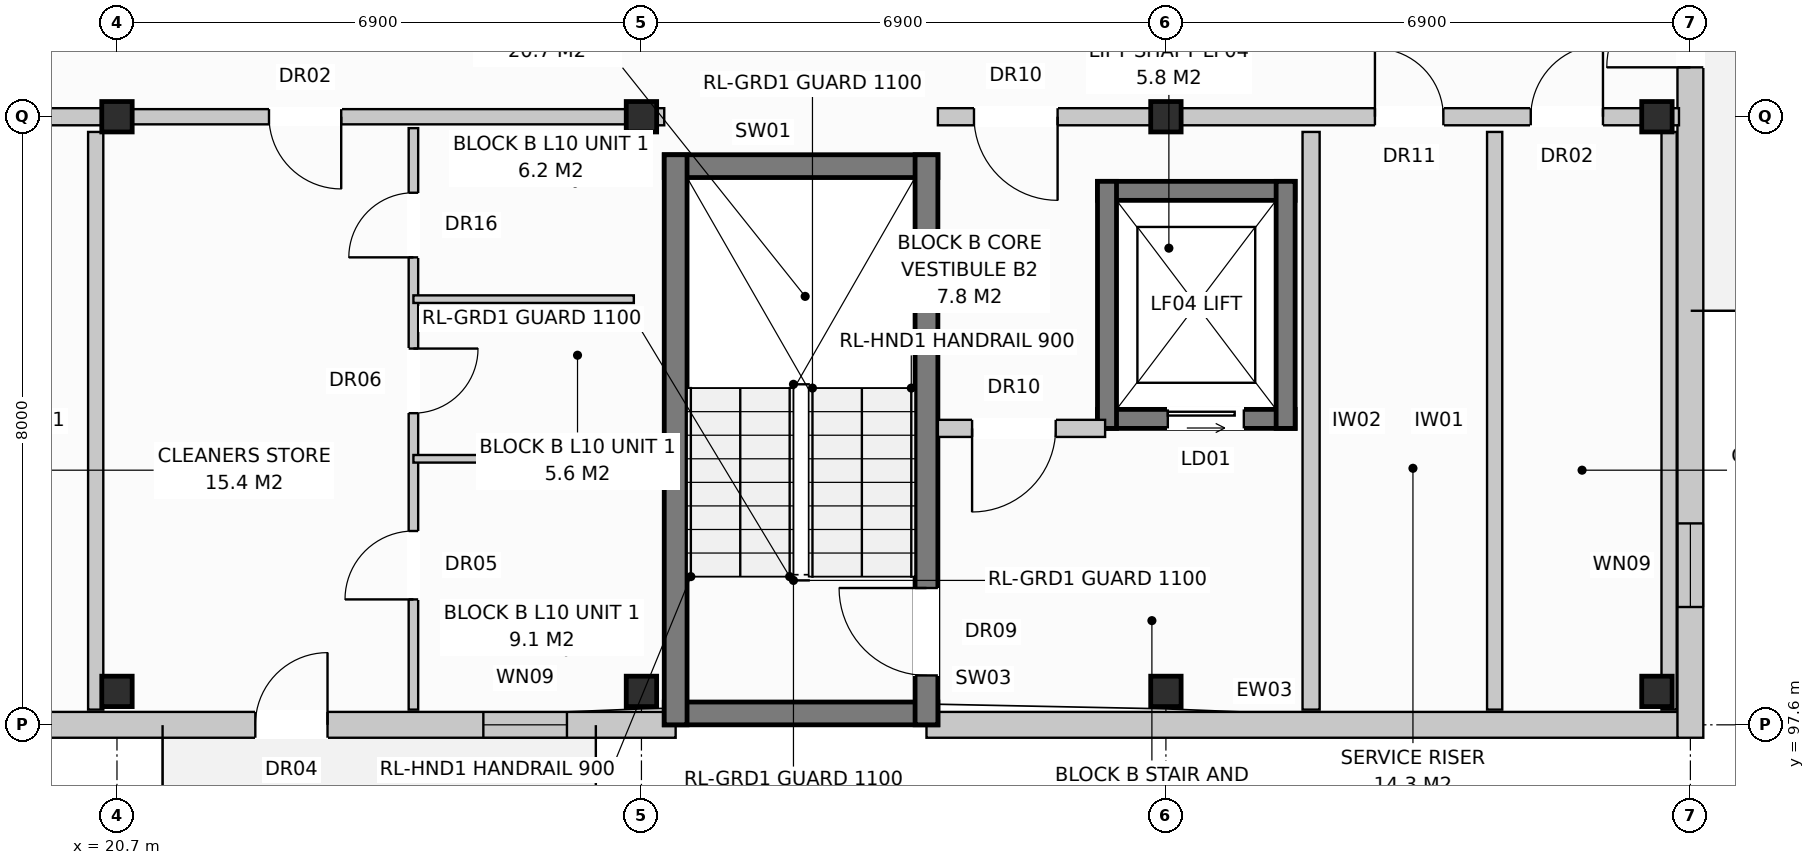
"""IFC4 building model, lengths in metres.
Left out: names, types, materials, properties, quantities, classifications, styles, units other than length and angle.
Written with IfcOpenShell. Run it as: python <this file> out.ifc"""

import sys

from ifc_helpers import new_model, si_unit, direction, frame, frame_2d, origin, origin_with_axes, origin_2d, place, context, subcontext, project, spatial, rectangle, extrude, element, fill, save


model = new_model("IFC4")
c1 = context("Model", 3, precision=1e-05, world=origin(), true_north=direction((0.0, 1.0)))
c2 = subcontext(c1, "Body", "Model", "MODEL_VIEW")
j1 = project(units=[si_unit("LENGTHUNIT", "METRE"), si_unit("PLANEANGLEUNIT", "RADIAN")], contexts=[c1])
p1 = place(None, origin())
s1 = spatial("IfcSite", under=j1, at=p1, CompositionType="ELEMENT")
p2 = place(p1, origin())
s2 = spatial("IfcBuilding", under=s1, at=p2, CompositionType="ELEMENT")
p3 = place(p2, frame((0.0, 0.0, 33.6)))
s3 = spatial("IfcBuildingStorey", under=s2, at=p3, CompositionType="ELEMENT", Elevation=33.6)
for number, where, z_axis, x_axis in (
    (1, (20.7, 98.04, 0.0), (0.0, 0.0, 1.0), (1.0, 0.0, 0.0)),
    (2, (20.7, 105.6, 0.0), (0.0, 0.0, 1.0), (1.0, 0.0, 0.0)),
    (3, (27.6, 98.04, 0.0), (0.0, 0.0, 1.0), (1.0, 0.0, 0.0)),
    (4, (27.6, 105.6, 0.0), (0.0, 0.0, 1.0), (1.0, 0.0, 0.0)),
    (5, (34.5, 98.04, 0.0), (0.0, 0.0, 1.0), (1.0, 0.0, 0.0)),
    (6, (34.5, 105.6, 0.0), (0.0, 0.0, 1.0), (1.0, 0.0, 0.0)),
    (7, (40.96, 98.04, 0.0), (0.0, 0.0, 1.0), (1.0, 0.0, 0.0)),
    (8, (40.96, 105.6, 0.0), (0.0, 0.0, 1.0), (1.0, 0.0, 0.0)),
):
    element("IfcColumn", number, at=place(p3, frame(where, z_axis=z_axis, x_axis=x_axis)), inside=s3, PredefinedType="COLUMN", context=c2, shape_type="SweptSolid", body=[
        extrude(rectangle(XDim=0.4, YDim=0.4, at=origin_2d()), origin(), (0.0, 0.0, 1.0), 3.2),
    ])
p4 = place(p3, frame((10.65, 97.6, 0.0), z_axis=(0.0, 0.0, 1.0), x_axis=(1.0, 0.0, 0.0)))
e9 = element("IfcWall", 9, at=p4, inside=s3, PredefinedType="STANDARD", context=c2, shape_type="SweptSolid", body=[
    extrude(rectangle(XDim=17.4, YDim=0.34, at=frame_2d((8.7, 0.0))), origin(), (0.0, 0.0, 1.0), 2.96),
])
p5 = place(p4, frame((11.87, 0.0, 0.0)))
e10 = element("IfcOpeningElement", 10, at=p5, cuts=e9, PredefinedType="OPENING", context=c2, shape_type="SweptSolid", body=[
    extrude(rectangle(XDim=0.95, YDim=2.1, at=frame_2d((0.475, 1.05))), frame((0.0, 0.182, 0.0), z_axis=(0.0, -1.0, 0.0), x_axis=(1.0, 0.0, 0.0)), (0.0, 0.0, 1.0), 0.364),
])
p6 = place(p4, frame((14.87, 0.0, 0.72)))
e11 = element("IfcOpeningElement", 11, at=p6, cuts=e9, PredefinedType="OPENING", context=c2, shape_type="SweptSolid", body=[
    extrude(rectangle(XDim=1.1, YDim=1.5, at=frame_2d((0.55, 0.75))), frame((0.0, 0.182, 0.0), z_axis=(0.0, -1.0, 0.0), x_axis=(1.0, 0.0, 0.0)), (0.0, 0.0, 1.0), 0.364),
])
p7 = place(p3, frame((31.35, 97.6, 0.0), z_axis=(0.0, 0.0, 1.0), x_axis=(1.0, 0.0, 0.0)))
e12 = element("IfcWall", 12, at=p7, inside=s3, PredefinedType="STANDARD", context=c2, shape_type="SweptSolid", body=[
    extrude(rectangle(XDim=9.89, YDim=0.34, at=frame_2d((4.945, 0.0))), origin(), (0.0, 0.0, 1.0), 2.96),
])
p8 = place(p3, frame((41.4, 97.43, 0.0), z_axis=(0.0, 0.0, 1.0), x_axis=(0.0, 1.0, 0.0)))
e13 = element("IfcWall", 13, at=p8, inside=s3, PredefinedType="STANDARD", context=c2, shape_type="SweptSolid", body=[
    extrude(rectangle(XDim=18.74, YDim=0.34, at=frame_2d((9.37, 0.0))), origin(), (0.0, 0.0, 1.0), 2.96),
])
p9 = place(p8, frame((8.82, 0.0, 0.0)))
e14 = element("IfcOpeningElement", 14, at=p9, cuts=e13, PredefinedType="OPENING", context=c2, shape_type="SweptSolid", body=[
    extrude(rectangle(XDim=1.1, YDim=2.1, at=frame_2d((0.55, 1.05))), frame((0.0, 0.182, 0.0), z_axis=(0.0, -1.0, 0.0), x_axis=(1.0, 0.0, 0.0)), (0.0, 0.0, 1.0), 0.364),
])
p10 = place(p8, frame((1.72, 0.0, 0.72)))
e15 = element("IfcOpeningElement", 15, at=p10, cuts=e13, PredefinedType="OPENING", context=c2, shape_type="SweptSolid", body=[
    extrude(rectangle(XDim=1.1, YDim=1.5, at=frame_2d((0.55, 0.75))), frame((0.0, 0.182, 0.0), z_axis=(0.0, -1.0, 0.0), x_axis=(1.0, 0.0, 0.0)), (0.0, 0.0, 1.0), 0.364),
])
p11 = place(p8, frame((15.92, 0.0, 0.72)))
e16 = element("IfcOpeningElement", 16, at=p11, cuts=e13, PredefinedType="OPENING", context=c2, shape_type="SweptSolid", body=[
    extrude(rectangle(XDim=1.1, YDim=1.5, at=frame_2d((0.55, 0.75))), frame((0.0, 0.182, 0.0), z_axis=(0.0, -1.0, 0.0), x_axis=(1.0, 0.0, 0.0)), (0.0, 0.0, 1.0), 0.364),
])
p12 = place(p3, frame((20.42, 97.8, 0.0), z_axis=(0.0, 0.0, 1.0), x_axis=(0.0, 1.0, 0.0)))
e17 = element("IfcWall", 17, at=p12, inside=s3, PredefinedType="PARTITIONING", context=c2, shape_type="SweptSolid", body=[
    extrude(rectangle(XDim=7.6, YDim=0.2, at=frame_2d((3.8, 0.0))), origin(), (0.0, 0.0, 1.0), 2.96),
])
p13 = place(p3, frame((10.8, 105.6, 0.0), z_axis=(0.0, 0.0, 1.0), x_axis=(1.0, 0.0, 0.0)))
e18 = element("IfcWall", 18, at=p13, inside=s3, PredefinedType="PARTITIONING", context=c2, shape_type="SweptSolid", body=[
    extrude(rectangle(XDim=9.9, YDim=0.225, at=frame_2d((4.95, 0.0))), origin(), (0.0, 0.0, 1.0), 2.4),
])
p14 = place(p13, frame((0.475, 0.0, 0.0)))
e19 = element("IfcOpeningElement", 19, at=p14, cuts=e18, PredefinedType="OPENING", context=c2, shape_type="SweptSolid", body=[
    extrude(rectangle(XDim=1.1, YDim=2.15, at=frame_2d((0.55, 1.075))), frame((0.0, 0.125, 0.0), z_axis=(0.0, -1.0, 0.0), x_axis=(1.0, 0.0, 0.0)), (0.0, 0.0, 1.0), 0.249),
])
p15 = place(p13, frame((5.75, 0.0, 0.0)))
e20 = element("IfcOpeningElement", 20, at=p15, cuts=e18, PredefinedType="OPENING", context=c2, shape_type="SweptSolid", body=[
    extrude(rectangle(XDim=0.9, YDim=2.1, at=frame_2d((0.45, 1.05))), frame((0.0, 0.125, 0.0), z_axis=(0.0, -1.0, 0.0), x_axis=(1.0, 0.0, 0.0)), (0.0, 0.0, 1.0), 0.249),
])
p16 = place(p13, frame((7.8, 0.0, 0.0)))
e21 = element("IfcOpeningElement", 21, at=p16, cuts=e18, PredefinedType="OPENING", context=c2, shape_type="SweptSolid", body=[
    extrude(rectangle(XDim=0.95, YDim=2.15, at=frame_2d((0.475, 1.075))), frame((0.0, 0.125, 0.0), z_axis=(0.0, -1.0, 0.0), x_axis=(1.0, 0.0, 0.0)), (0.0, 0.0, 1.0), 0.249),
])
for number, where, z_axis, x_axis in (
    (22, (27.9, 97.75, 0.0), (0.0, 0.0, 1.0), (1.0, 0.0, 0.0)),
    (23, (27.9, 104.95, 0.0), (0.0, 0.0, 1.0), (1.0, 0.0, 0.0)),
):
    element("IfcWall", number, at=place(p3, frame(where, z_axis=z_axis, x_axis=x_axis)), inside=s3, PredefinedType="SHEAR", context=c2, shape_type="SweptSolid", body=[
        extrude(rectangle(XDim=3.6, YDim=0.3, at=frame_2d((1.8, 0.0))), origin(), (0.0, 0.0, 1.0), 2.96),
    ])
p17 = place(p3, frame((28.05, 97.6, 0.0), z_axis=(0.0, 0.0, 1.0), x_axis=(0.0, 1.0, 0.0)))
e24 = element("IfcWall", 24, at=p17, inside=s3, PredefinedType="SHEAR", context=c2, shape_type="SweptSolid", body=[
    extrude(rectangle(XDim=7.5, YDim=0.3, at=frame_2d((3.75, 0.0))), origin(), (0.0, 0.0, 1.0), 2.96),
])
p18 = place(p3, frame((31.35, 97.6, 0.0), z_axis=(0.0, 0.0, 1.0), x_axis=(0.0, 1.0, 0.0)))
e25 = element("IfcWall", 25, at=p18, inside=s3, PredefinedType="SHEAR", context=c2, shape_type="SweptSolid", body=[
    extrude(rectangle(XDim=7.5, YDim=0.3, at=frame_2d((3.75, 0.0))), origin(), (0.0, 0.0, 1.0), 2.96),
])
p19 = place(p18, frame((0.65, 0.0, 0.0)))
e26 = element("IfcOpeningElement", 26, at=p19, cuts=e25, PredefinedType="OPENING", context=c2, shape_type="SweptSolid", body=[
    extrude(rectangle(XDim=1.15, YDim=2.15, at=frame_2d((0.575, 1.075))), frame((0.0, 0.162, 0.0), z_axis=(0.0, -1.0, 0.0), x_axis=(1.0, 0.0, 0.0)), (0.0, 0.0, 1.0), 0.324),
])
p20 = place(p3, frame((33.6, 101.625, 0.0), z_axis=(0.0, 0.0, 1.0), x_axis=(1.0, 0.0, 0.0)))
e27 = element("IfcWall", 27, at=p20, inside=s3, PredefinedType="SHEAR", context=c2, shape_type="SweptSolid", body=[
    extrude(rectangle(XDim=2.6, YDim=0.25, at=frame_2d((1.3, 0.0))), origin(), (0.0, 0.0, 1.0), 2.96),
])
p21 = place(p20, frame((0.925, 0.0, 0.0)))
e28 = element("IfcOpeningElement", 28, at=p21, cuts=e27, PredefinedType="OPENING", context=c2, shape_type="SweptSolid", body=[
    extrude(rectangle(XDim=1.0, YDim=2.1, at=frame_2d((0.5, 1.05))), frame((0.0, 0.137, 0.0), z_axis=(0.0, -1.0, 0.0), x_axis=(1.0, 0.0, 0.0)), (0.0, 0.0, 1.0), 0.274),
])
p22 = place(p3, frame((33.6, 104.625, 0.0), z_axis=(0.0, 0.0, 1.0), x_axis=(1.0, 0.0, 0.0)))
e29 = element("IfcWall", 29, at=p22, inside=s3, PredefinedType="SHEAR", context=c2, shape_type="SweptSolid", body=[
    extrude(rectangle(XDim=2.6, YDim=0.25, at=frame_2d((1.3, 0.0))), origin(), (0.0, 0.0, 1.0), 2.96),
])
for number, where, z_axis, x_axis in (
    (30, (33.725, 101.5, 0.0), (0.0, 0.0, 1.0), (0.0, 1.0, 0.0)),
    (31, (36.075, 101.5, 0.0), (0.0, 0.0, 1.0), (0.0, 1.0, 0.0)),
):
    element("IfcWall", number, at=place(p3, frame(where, z_axis=z_axis, x_axis=x_axis)), inside=s3, PredefinedType="SHEAR", context=c2, shape_type="SweptSolid", body=[
        extrude(rectangle(XDim=3.25, YDim=0.25, at=frame_2d((1.625, 0.0))), origin(), (0.0, 0.0, 1.0), 2.96),
    ])
p23 = place(p3, frame((36.41, 97.8, 0.0), z_axis=(0.0, 0.0, 1.0), x_axis=(0.0, 1.0, 0.0)))
e32 = element("IfcWall", 32, at=p23, inside=s3, PredefinedType="PARTITIONING", context=c2, shape_type="SweptSolid", body=[
    extrude(rectangle(XDim=7.6, YDim=0.225, at=frame_2d((3.8, 0.0))), origin(), (0.0, 0.0, 1.0), 2.59),
])
p24 = place(p3, frame((31.5, 101.5, 0.0), z_axis=(0.0, 0.0, 1.0), x_axis=(1.0, 0.0, 0.0)))
e33 = element("IfcWall", 33, at=p24, inside=s3, PredefinedType="PARTITIONING", context=c2, shape_type="SweptSolid", body=[
    extrude(rectangle(XDim=2.2, YDim=0.225, at=frame_2d((1.1, 0.0))), origin(), (0.0, 0.0, 1.0), 2.96),
])
p25 = place(p24, frame((0.45, 0.0, 0.0)))
e34 = element("IfcOpeningElement", 34, at=p25, cuts=e33, PredefinedType="OPENING", context=c2, shape_type="SweptSolid", body=[
    extrude(rectangle(XDim=1.1, YDim=2.15, at=frame_2d((0.55, 1.075))), frame((0.0, 0.125, 0.0), z_axis=(0.0, -1.0, 0.0), x_axis=(1.0, 0.0, 0.0)), (0.0, 0.0, 1.0), 0.249),
])
p26 = place(p3, frame((27.6, 105.6, 0.0), z_axis=(0.0, 0.0, 1.0), x_axis=(1.0, 0.0, 0.0)))
e35 = element("IfcWall", 35, at=p26, inside=s3, PredefinedType="PARTITIONING", context=c2, shape_type="SweptSolid", body=[
    extrude(rectangle(XDim=0.3, YDim=0.225, at=frame_2d((0.15, 0.0))), origin(), (0.0, 0.0, 1.0), 2.96),
])
p27 = place(p3, frame((38.825, 97.8, 0.0), z_axis=(0.0, 0.0, 1.0), x_axis=(0.0, 1.0, 0.0)))
e36 = element("IfcWall", 36, at=p27, inside=s3, PredefinedType="PARTITIONING", context=c2, shape_type="SweptSolid", body=[
    extrude(rectangle(XDim=7.6, YDim=0.2, at=frame_2d((3.8, 0.0))), origin(), (0.0, 0.0, 1.0), 2.96),
])
p28 = place(p3, frame((41.12, 97.8, 0.0), z_axis=(0.0, 0.0, 1.0), x_axis=(0.0, 1.0, 0.0)))
e37 = element("IfcWall", 37, at=p28, inside=s3, PredefinedType="PARTITIONING", context=c2, shape_type="SweptSolid", body=[
    extrude(rectangle(XDim=7.6, YDim=0.2, at=frame_2d((3.8, 0.0))), origin(), (0.0, 0.0, 1.0), 2.4),
])
p29 = place(p3, frame((31.5, 105.6, 0.0), z_axis=(0.0, 0.0, 1.0), x_axis=(1.0, 0.0, 0.0)))
e38 = element("IfcWall", 38, at=p29, inside=s3, PredefinedType="PARTITIONING", context=c2, shape_type="SweptSolid", body=[
    extrude(rectangle(XDim=9.75, YDim=0.225, at=frame_2d((4.875, 0.0))), origin(), (0.0, 0.0, 1.0), 2.4),
])
p30 = place(p29, frame((0.475, 0.0, 0.0)))
e39 = element("IfcOpeningElement", 39, at=p30, cuts=e38, PredefinedType="OPENING", context=c2, shape_type="SweptSolid", body=[
    extrude(rectangle(XDim=1.1, YDim=2.15, at=frame_2d((0.55, 1.075))), frame((0.0, 0.125, 0.0), z_axis=(0.0, -1.0, 0.0), x_axis=(1.0, 0.0, 0.0)), (0.0, 0.0, 1.0), 0.249),
])
p31 = place(p29, frame((5.75, 0.0, 0.0)))
e40 = element("IfcOpeningElement", 40, at=p31, cuts=e38, PredefinedType="OPENING", context=c2, shape_type="SweptSolid", body=[
    extrude(rectangle(XDim=0.9, YDim=2.1, at=frame_2d((0.45, 1.05))), frame((0.0, 0.125, 0.0), z_axis=(0.0, -1.0, 0.0), x_axis=(1.0, 0.0, 0.0)), (0.0, 0.0, 1.0), 0.249),
])
p32 = place(p29, frame((7.8, 0.0, 0.0)))
e41 = element("IfcOpeningElement", 41, at=p32, cuts=e38, PredefinedType="OPENING", context=c2, shape_type="SweptSolid", body=[
    extrude(rectangle(XDim=0.95, YDim=2.15, at=frame_2d((0.475, 1.075))), frame((0.0, 0.125, 0.0), z_axis=(0.0, -1.0, 0.0), x_axis=(1.0, 0.0, 0.0)), (0.0, 0.0, 1.0), 0.249),
])
p33 = place(p3, frame((20.7, 105.6, 0.0), z_axis=(0.0, 0.0, 1.0), x_axis=(1.0, 0.0, 0.0)))
e42 = element("IfcWall", 42, at=p33, inside=s3, PredefinedType="PARTITIONING", context=c2, shape_type="SweptSolid", body=[
    extrude(rectangle(XDim=6.9, YDim=0.2, at=frame_2d((3.45, 0.0))), origin(), (0.0, 0.0, 1.0), 2.4),
])
p34 = place(p33, frame((2.0, 0.0, 0.0)))
e43 = element("IfcOpeningElement", 43, at=p34, cuts=e42, PredefinedType="OPENING", context=c2, shape_type="SweptSolid", body=[
    extrude(rectangle(XDim=0.95, YDim=2.15, at=frame_2d((0.475, 1.075))), frame((0.0, 0.112, 0.0), z_axis=(0.0, -1.0, 0.0), x_axis=(1.0, 0.0, 0.0)), (0.0, 0.0, 1.0), 0.224),
])
p35 = place(p3, frame((24.6, 105.45, 0.0), z_axis=(0.0, 0.0, 1.0), x_axis=(0.0, -1.0, 0.0)))
e44 = element("IfcWall", 44, at=p35, inside=s3, PredefinedType="PARTITIONING", context=c2, shape_type="SweptSolid", body=[
    extrude(rectangle(XDim=7.65, YDim=0.125, at=frame_2d((3.825, 0.0))), origin(), (0.0, 0.0, 1.0), 2.96),
])
p36 = place(p35, frame((0.85, 0.0, 0.0)))
e45 = element("IfcOpeningElement", 45, at=p36, cuts=e44, PredefinedType="OPENING", context=c2, shape_type="SweptSolid", body=[
    extrude(rectangle(XDim=0.85, YDim=2.1, at=frame_2d((0.425, 1.05))), frame((0.0, 0.074, 0.0), z_axis=(0.0, -1.0, 0.0), x_axis=(1.0, 0.0, 0.0)), (0.0, 0.0, 1.0), 0.149),
])
p37 = place(p35, frame((2.9, 0.0, 0.0)))
e46 = element("IfcOpeningElement", 46, at=p37, cuts=e44, PredefinedType="OPENING", context=c2, shape_type="SweptSolid", body=[
    extrude(rectangle(XDim=0.85, YDim=2.05, at=frame_2d((0.425, 1.025))), frame((0.0, 0.074, 0.0), z_axis=(0.0, -1.0, 0.0), x_axis=(1.0, 0.0, 0.0)), (0.0, 0.0, 1.0), 0.149),
])
p38 = place(p35, frame((5.3, 0.0, 0.0)))
e47 = element("IfcOpeningElement", 47, at=p38, cuts=e44, PredefinedType="OPENING", context=c2, shape_type="SweptSolid", body=[
    extrude(rectangle(XDim=0.9, YDim=2.1, at=frame_2d((0.45, 1.05))), frame((0.0, 0.074, 0.0), z_axis=(0.0, -1.0, 0.0), x_axis=(1.0, 0.0, 0.0)), (0.0, 0.0, 1.0), 0.149),
])
for number, where, z_axis, x_axis in (
    (48, (24.6, 103.2, 0.0), (0.0, 0.0, 1.0), (1.0, 0.0, 0.0)),
    (49, (24.6, 101.1, 0.0), (0.0, 0.0, 1.0), (1.0, 0.0, 0.0)),
):
    element("IfcWall", number, at=place(p3, frame(where, z_axis=z_axis, x_axis=x_axis)), inside=s3, PredefinedType="PARTITIONING", context=c2, shape_type="SweptSolid", body=[
        extrude(rectangle(XDim=2.9, YDim=0.1, at=frame_2d((1.45, 0.0))), origin(), (0.0, 0.0, 1.0), 2.96),
    ])
p39 = place(p5, origin_with_axes())
e50 = element("IfcDoor", 50, at=p39, inside=s3, OperationType="SINGLE_SWING_RIGHT", PredefinedType="DOOR", context=c2, shape_type="SweptSolid", body=[
    extrude(rectangle(XDim=0.95, YDim=2.1, at=frame_2d((0.475, 1.05))), frame((0.0, 0.025, 0.0), z_axis=(0.0, -1.0, 0.0), x_axis=(1.0, 0.0, 0.0)), (0.0, 0.0, 1.0), 0.05),
])
fill(e10, e50)
p40 = place(p6, origin_with_axes())
e51 = element("IfcWindow", 51, at=p40, inside=s3, PartitioningType="SINGLE_PANEL", PredefinedType="WINDOW", context=c2, shape_type="SweptSolid", body=[
    extrude(rectangle(XDim=1.1, YDim=1.5, at=frame_2d((0.55, 0.75))), frame((0.0, 0.03, 0.0), z_axis=(0.0, -1.0, 0.0), x_axis=(1.0, 0.0, 0.0)), (0.0, 0.0, 1.0), 0.06),
])
fill(e11, e51)
p41 = place(p9, origin_with_axes())
e52 = element("IfcDoor", 52, at=p41, inside=s3, OperationType="SINGLE_SWING_LEFT", PredefinedType="DOOR", context=c2, shape_type="SweptSolid", body=[
    extrude(rectangle(XDim=1.1, YDim=2.1, at=frame_2d((0.55, 1.05))), frame((0.0, 0.025, 0.0), z_axis=(0.0, -1.0, 0.0), x_axis=(1.0, 0.0, 0.0)), (0.0, 0.0, 1.0), 0.05),
])
fill(e14, e52)
p42 = place(p10, origin_with_axes())
e53 = element("IfcWindow", 53, at=p42, inside=s3, PartitioningType="SINGLE_PANEL", PredefinedType="WINDOW", context=c2, shape_type="SweptSolid", body=[
    extrude(rectangle(XDim=1.1, YDim=1.5, at=frame_2d((0.55, 0.75))), frame((0.0, 0.03, 0.0), z_axis=(0.0, -1.0, 0.0), x_axis=(1.0, 0.0, 0.0)), (0.0, 0.0, 1.0), 0.06),
])
fill(e15, e53)
p43 = place(p19, origin_with_axes())
e54 = element("IfcDoor", 54, at=p43, inside=s3, OperationType="SINGLE_SWING_RIGHT", PredefinedType="DOOR", context=c2, shape_type="SweptSolid", body=[
    extrude(rectangle(XDim=1.15, YDim=2.15, at=frame_2d((0.575, 1.075))), frame((0.0, 0.025, 0.0), z_axis=(0.0, -1.0, 0.0), x_axis=(1.0, 0.0, 0.0)), (0.0, 0.0, 1.0), 0.05),
])
fill(e26, e54)
p44 = place(p21, origin_with_axes())
e55 = element("IfcDoor", 55, at=p44, inside=s3, OperationType="SLIDING_TO_LEFT", PredefinedType="DOOR", context=c2, shape_type="SweptSolid", body=[
    extrude(rectangle(XDim=1.0, YDim=2.1, at=frame_2d((0.5, 1.05))), frame((0.0, 0.025, 0.0), z_axis=(0.0, -1.0, 0.0), x_axis=(1.0, 0.0, 0.0)), (0.0, 0.0, 1.0), 0.05),
])
fill(e28, e55)
p45 = place(p25, frame((1.1, 0.0, 0.0), z_axis=(0.0, 0.0, 1.0), x_axis=(-1.0, 0.0, 0.0)))
e56 = element("IfcDoor", 56, at=p45, inside=s3, OperationType="SINGLE_SWING_LEFT", PredefinedType="DOOR", context=c2, shape_type="SweptSolid", body=[
    extrude(rectangle(XDim=1.1, YDim=2.15, at=frame_2d((0.55, 1.075))), frame((0.0, 0.025, 0.0), z_axis=(0.0, -1.0, 0.0), x_axis=(1.0, 0.0, 0.0)), (0.0, 0.0, 1.0), 0.05),
])
fill(e34, e56)
p46 = place(p30, frame((1.1, 0.0, 0.0), z_axis=(0.0, 0.0, 1.0), x_axis=(-1.0, 0.0, 0.0)))
e57 = element("IfcDoor", 57, at=p46, inside=s3, OperationType="SINGLE_SWING_RIGHT", PredefinedType="DOOR", context=c2, shape_type="SweptSolid", body=[
    extrude(rectangle(XDim=1.1, YDim=2.15, at=frame_2d((0.55, 1.075))), frame((0.0, 0.025, 0.0), z_axis=(0.0, -1.0, 0.0), x_axis=(1.0, 0.0, 0.0)), (0.0, 0.0, 1.0), 0.05),
])
fill(e39, e57)
p47 = place(p31, origin_with_axes())
e58 = element("IfcDoor", 58, at=p47, inside=s3, OperationType="SINGLE_SWING_LEFT", PredefinedType="DOOR", context=c2, shape_type="SweptSolid", body=[
    extrude(rectangle(XDim=0.9, YDim=2.1, at=frame_2d((0.45, 1.05))), frame((0.0, 0.025, 0.0), z_axis=(0.0, -1.0, 0.0), x_axis=(1.0, 0.0, 0.0)), (0.0, 0.0, 1.0), 0.05),
])
fill(e40, e58)
p48 = place(p32, origin_with_axes())
e59 = element("IfcDoor", 59, at=p48, inside=s3, OperationType="SINGLE_SWING_RIGHT", PredefinedType="DOOR", context=c2, shape_type="SweptSolid", body=[
    extrude(rectangle(XDim=0.95, YDim=2.15, at=frame_2d((0.475, 1.075))), frame((0.0, 0.025, 0.0), z_axis=(0.0, -1.0, 0.0), x_axis=(1.0, 0.0, 0.0)), (0.0, 0.0, 1.0), 0.05),
])
fill(e41, e59)
p49 = place(p34, frame((0.95, 0.0, 0.0), z_axis=(0.0, 0.0, 1.0), x_axis=(-1.0, 0.0, 0.0)))
e60 = element("IfcDoor", 60, at=p49, inside=s3, OperationType="SINGLE_SWING_RIGHT", PredefinedType="DOOR", context=c2, shape_type="SweptSolid", body=[
    extrude(rectangle(XDim=0.95, YDim=2.15, at=frame_2d((0.475, 1.075))), frame((0.0, 0.025, 0.0), z_axis=(0.0, -1.0, 0.0), x_axis=(1.0, 0.0, 0.0)), (0.0, 0.0, 1.0), 0.05),
])
fill(e43, e60)
p50 = place(p36, frame((0.85, 0.0, 0.0), z_axis=(0.0, 0.0, 1.0), x_axis=(-1.0, 0.0, 0.0)))
e61 = element("IfcDoor", 61, at=p50, inside=s3, OperationType="SINGLE_SWING_RIGHT", PredefinedType="DOOR", context=c2, shape_type="SweptSolid", body=[
    extrude(rectangle(XDim=0.85, YDim=2.1, at=frame_2d((0.425, 1.05))), frame((0.0, 0.025, 0.0), z_axis=(0.0, -1.0, 0.0), x_axis=(1.0, 0.0, 0.0)), (0.0, 0.0, 1.0), 0.05),
])
fill(e45, e61)
p51 = place(p37, origin_with_axes())
e62 = element("IfcDoor", 62, at=p51, inside=s3, OperationType="SINGLE_SWING_LEFT", PredefinedType="DOOR", context=c2, shape_type="SweptSolid", body=[
    extrude(rectangle(XDim=0.85, YDim=2.05, at=frame_2d((0.425, 1.025))), frame((0.0, 0.025, 0.0), z_axis=(0.0, -1.0, 0.0), x_axis=(1.0, 0.0, 0.0)), (0.0, 0.0, 1.0), 0.05),
])
fill(e46, e62)
p52 = place(p38, frame((0.9, 0.0, 0.0), z_axis=(0.0, 0.0, 1.0), x_axis=(-1.0, 0.0, 0.0)))
e63 = element("IfcDoor", 63, at=p52, inside=s3, OperationType="SINGLE_SWING_RIGHT", PredefinedType="DOOR", context=c2, shape_type="SweptSolid", body=[
    extrude(rectangle(XDim=0.9, YDim=2.1, at=frame_2d((0.45, 1.05))), frame((0.0, 0.025, 0.0), z_axis=(0.0, -1.0, 0.0), x_axis=(1.0, 0.0, 0.0)), (0.0, 0.0, 1.0), 0.05),
])
fill(e47, e63)
save(model, sys.argv[1])
